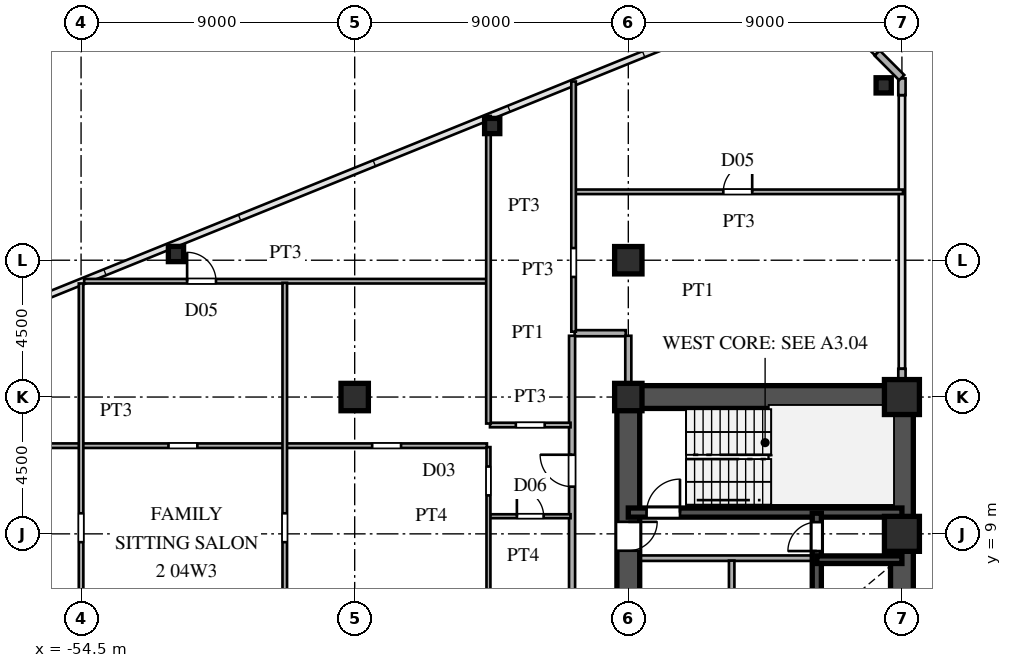
"""IFC4 building model, lengths in metres.
Left out: names, types, materials, properties, quantities, classifications, styles, units other than length and angle.
Written with IfcOpenShell. Run it as: python <this file> out.ifc"""

import sys

from ifc_helpers import new_model, si_unit, direction, frame, frame_2d, origin, origin_2d, place, context, subcontext, project, spatial, rectangle, hollow_rectangle, i_section, extrude, source, transform, mapped, element, fill, save


model = new_model("IFC4")
c1 = context("Model", 3, precision=1e-05, world=origin(), true_north=direction((0.0, 1.0)))
c2 = subcontext(c1, "Body", "Model", "MODEL_VIEW")
j1 = project(units=[si_unit("LENGTHUNIT", "METRE"), si_unit("PLANEANGLEUNIT", "RADIAN")], contexts=[c1])
p1 = place(None, origin())
s1 = spatial("IfcSite", under=j1, at=p1, CompositionType="ELEMENT")
p2 = place(p1, origin())
s2 = spatial("IfcBuilding", under=s1, at=p2, CompositionType="ELEMENT")
p3 = place(p2, frame((0.0, 0.0, 18.9)))
s3 = spatial("IfcBuildingStorey", under=s2, at=p3, CompositionType="ELEMENT", Elevation=18.9)
m1 = source(origin(), c2, "Body", "SweptSolid", [
    extrude(hollow_rectangle(XDim=1.15, YDim=1.15, WallThickness=0.048, at=origin_2d()), origin(), (0.0, 0.0, 1.0), 3.6),
])
for number, where, z_axis, x_axis in (
    (1, (-27.5, 9.0, 0.0), (0.0, 0.0, 1.0), (1.0, 0.0, 0.0)),
    (2, (-27.5, 13.5, 0.0), (0.0, 0.0, 1.0), (1.0, 0.0, 0.0)),
):
    element("IfcColumn", number, at=place(p3, frame(where, z_axis=z_axis, x_axis=x_axis)), inside=s3, PredefinedType="COLUMN", context=c2, shape_type="MappedRepresentation", body=[
        mapped(m1, transform((0.0, 0.0, 0.0), scale=1.0)),
    ])
m2 = source(origin(), c2, "Body", "SweptSolid", [
    extrude(i_section(OverallWidth=0.9, OverallDepth=0.9, WebThickness=0.036, FlangeThickness=0.055, at=origin_2d()), origin(), (0.0, 0.0, 1.0), 3.6),
])
for number, where, z_axis, x_axis in (
    (3, (-36.5, 13.5, 0.0), (0.0, 0.0, 1.0), (1.0, 0.0, 0.0)),
    (4, (-36.5, 18.0, 0.0), (0.0, 0.0, 1.0), (1.0, 0.0, 0.0)),
    (5, (-45.5, 13.5, 0.0), (0.0, 0.0, 1.0), (1.0, 0.0, 0.0)),
):
    element("IfcColumn", number, at=place(p3, frame(where, z_axis=z_axis, x_axis=x_axis)), inside=s3, PredefinedType="COLUMN", context=c2, shape_type="MappedRepresentation", body=[
        mapped(m2, transform((0.0, 0.0, 0.0), scale=1.0)),
    ])
m3 = source(origin(), c2, "Body", "SweptSolid", [
    extrude(hollow_rectangle(XDim=0.5, YDim=0.5, WallThickness=0.02, at=origin_2d()), origin(), (0.0, 0.0, 1.0), 3.6),
])
for number, where, z_axis, x_axis in (
    (6, (-28.1, 23.751, 0.0), (0.0, 0.0, 1.0), (1.0, 0.0, 0.0)),
    (7, (-40.977, 22.414, 0.0), (0.0, 0.0, 1.0), (1.0, 0.0, 0.0)),
    (8, (-51.378, 18.204, 0.0), (0.0, 0.0, 1.0), (1.0, 0.0, 0.0)),
):
    element("IfcColumn", number, at=place(p3, frame(where, z_axis=z_axis, x_axis=x_axis)), inside=s3, PredefinedType="COLUMN", context=c2, shape_type="MappedRepresentation", body=[
        mapped(m3, transform((0.0, 0.0, 0.0), scale=1.0)),
    ])
p4 = place(p3, frame((-27.5, 13.88, 0.0), z_axis=(0.0, 0.0, 1.0), x_axis=(0.0, 1.0, 0.0)))
e9 = element("IfcWall", 9, at=p4, inside=s3, PredefinedType="SOLIDWALL", context=c2, shape_type="SweptSolid", body=[
    extrude(rectangle(XDim=0.55, YDim=0.24, at=frame_2d((0.275, 0.0))), origin(), (0.0, 0.0, 1.0), 2.88),
])
p5 = place(p3, frame((-27.5, 23.43, 0.0), z_axis=(0.0, 0.0, 1.0), x_axis=(0.0, 1.0, 0.0)))
e10 = element("IfcWall", 10, at=p5, inside=s3, PredefinedType="SOLIDWALL", context=c2, shape_type="SweptSolid", body=[
    extrude(rectangle(XDim=0.55, YDim=0.24, at=frame_2d((0.275, 0.0))), origin(), (0.0, 0.0, 1.0), 3.38),
])
p6 = place(p3, frame((-27.507, 24.007, 0.0), z_axis=(0.0, 0.0, 1.0), x_axis=(-0.707106781187, 0.707106781187, 0.0)))
e11 = element("IfcWall", 11, at=p6, inside=s3, PredefinedType="SOLIDWALL", context=c2, shape_type="SweptSolid", body=[
    extrude(rectangle(XDim=1.14, YDim=0.24, at=frame_2d((0.57, 0.0))), origin(), (0.0, 0.0, 1.0), 3.38),
])
p7 = place(p3, frame((-27.5, 1.3, 0.0), z_axis=(0.0, 0.0, 1.0), x_axis=(0.0, 1.0, 0.0)))
e12 = element("IfcWall", 12, at=p7, inside=s3, PredefinedType="SHEAR", context=c2, shape_type="SweptSolid", body=[
    extrude(rectangle(XDim=12.2, YDim=0.75, at=frame_2d((6.1, 0.0))), origin(), (0.0, 0.0, 1.0), 3.38),
])
p8 = place(p3, frame((-36.5, 13.5, 0.0), z_axis=(0.0, 0.0, 1.0), x_axis=(1.0, 0.0, 0.0)))
e13 = element("IfcWall", 13, at=p8, inside=s3, PredefinedType="SHEAR", context=c2, shape_type="SweptSolid", body=[
    extrude(rectangle(XDim=9.0, YDim=0.75, at=frame_2d((4.5, 0.0))), origin(), (0.0, 0.0, 1.0), 3.38),
])
p9 = place(p3, frame((-36.5, 8.2, 0.0), z_axis=(0.0, 0.0, 1.0), x_axis=(0.0, 1.0, 0.0)))
e14 = element("IfcWall", 14, at=p9, inside=s3, PredefinedType="SHEAR", context=c2, shape_type="SweptSolid", body=[
    extrude(rectangle(XDim=5.45, YDim=0.75, at=frame_2d((2.725, 0.0))), origin(), (0.0, 0.0, 1.0), 3.38),
])
p10 = place(p9, frame((0.245, 0.0, 0.0)))
e15 = element("IfcOpeningElement", 15, at=p10, cuts=e14, PredefinedType="OPENING", context=c2, shape_type="SweptSolid", body=[
    extrude(rectangle(XDim=0.95, YDim=2.15, at=frame_2d((0.475, 1.075))), frame((0.0, 0.385, 0.0), z_axis=(0.0, -1.0, 0.0), x_axis=(1.0, 0.0, 0.0)), (0.0, 0.0, 1.0), 0.77),
])
p11 = place(p3, frame((-36.5, 1.3, 0.0), z_axis=(0.0, 0.0, 1.0), x_axis=(0.0, 1.0, 0.0)))
e16 = element("IfcWall", 16, at=p11, inside=s3, PredefinedType="SHEAR", context=c2, shape_type="SweptSolid", body=[
    extrude(rectangle(XDim=6.9, YDim=0.75, at=frame_2d((3.45, 0.0))), origin(), (0.0, 0.0, 1.0), 3.38),
])
p12 = place(p11, frame((2.975, 0.0, 0.0)))
e17 = element("IfcOpeningElement", 17, at=p12, cuts=e16, PredefinedType="OPENING", context=c2, shape_type="SweptSolid", body=[
    extrude(rectangle(XDim=0.95, YDim=2.15, at=frame_2d((0.475, 1.075))), frame((0.0, 0.385, 0.0), z_axis=(0.0, -1.0, 0.0), x_axis=(1.0, 0.0, 0.0)), (0.0, 0.0, 1.0), 0.77),
])
p13 = place(p3, frame((-36.5, 9.7, 0.0), z_axis=(0.0, 0.0, 1.0), x_axis=(1.0, 0.0, 0.0)))
e18 = element("IfcWall", 18, at=p13, inside=s3, PredefinedType="SHEAR", context=c2, shape_type="SweptSolid", body=[
    extrude(rectangle(XDim=9.0, YDim=0.3, at=frame_2d((4.5, 0.0))), origin(), (0.0, 0.0, 1.0), 3.38),
])
p14 = place(p13, frame((0.6, 0.0, 0.0)))
e19 = element("IfcOpeningElement", 19, at=p14, cuts=e18, PredefinedType="OPENING", context=c2, shape_type="SweptSolid", body=[
    extrude(rectangle(XDim=1.1, YDim=2.2, at=frame_2d((0.55, 1.1))), frame((0.0, 0.16, 0.0), z_axis=(0.0, -1.0, 0.0), x_axis=(1.0, 0.0, 0.0)), (0.0, 0.0, 1.0), 0.32),
])
p15 = place(p3, frame((-30.3, 8.15, 0.0), z_axis=(0.0, 0.0, 1.0), x_axis=(1.0, 0.0, 0.0)))
e20 = element("IfcWall", 20, at=p15, inside=s3, PredefinedType="SHEAR", context=c2, shape_type="SweptSolid", body=[
    extrude(rectangle(XDim=2.8, YDim=0.25, at=frame_2d((1.4, 0.0))), origin(), (0.0, 0.0, 1.0), 3.38),
])
p16 = place(p3, frame((-30.3, 5.9, 0.0), z_axis=(0.0, 0.0, 1.0), x_axis=(0.0, 1.0, 0.0)))
e21 = element("IfcWall", 21, at=p16, inside=s3, PredefinedType="SHEAR", context=c2, shape_type="SweptSolid", body=[
    extrude(rectangle(XDim=2.25, YDim=0.3, at=frame_2d((1.125, 0.0))), origin(), (0.0, 0.0, 1.0), 3.38),
])
p17 = place(p3, frame((-30.3, 8.15, 0.0), z_axis=(0.0, 0.0, 1.0), x_axis=(0.0, 1.0, 0.0)))
e22 = element("IfcWall", 22, at=p17, inside=s3, PredefinedType="SHEAR", context=c2, shape_type="SweptSolid", body=[
    extrude(rectangle(XDim=1.53, YDim=0.3, at=frame_2d((0.765, 0.0))), origin(), (0.0, 0.0, 1.0), 3.38),
])
p18 = place(p17, frame((0.285, 0.0, 0.0)))
e23 = element("IfcOpeningElement", 23, at=p18, cuts=e22, PredefinedType="OPENING", context=c2, shape_type="SweptSolid", body=[
    extrude(rectangle(XDim=0.95, YDim=2.15, at=frame_2d((0.475, 1.075))), frame((0.0, 0.16, 0.0), z_axis=(0.0, -1.0, 0.0), x_axis=(1.0, 0.0, 0.0)), (0.0, 0.0, 1.0), 0.32),
])
p19 = place(p3, frame((-36.15, 8.2, 0.0), z_axis=(0.0, 0.0, 1.0), x_axis=(1.0, 0.0, 0.0)))
e24 = element("IfcWall", 24, at=p19, inside=s3, PredefinedType="PARTITIONING", context=c2, shape_type="SweptSolid", body=[
    extrude(rectangle(XDim=5.7, YDim=0.18, at=frame_2d((2.85, 0.0))), origin(), (0.0, 0.0, 1.0), 3.38),
])
p20 = place(p3, frame((-33.1, 1.38, 0.0), z_axis=(0.0, 0.0, 1.0), x_axis=(0.0, 1.0, 0.0)))
e25 = element("IfcWall", 25, at=p20, inside=s3, PredefinedType="PARTITIONING", context=c2, shape_type="SweptSolid", body=[
    extrude(rectangle(XDim=6.74, YDim=0.18, at=frame_2d((3.37, 0.0))), origin(), (0.0, 0.0, 1.0), 3.38),
])
p21 = place(p3, frame((-41.05, 9.58, 0.0), z_axis=(0.0, 0.0, 1.0), x_axis=(1.0, 0.0, 0.0)))
e26 = element("IfcWall", 26, at=p21, inside=s3, PredefinedType="PARTITIONING", context=c2, shape_type="SweptSolid", body=[
    extrude(rectangle(XDim=2.65, YDim=0.13, at=frame_2d((1.325, 0.0))), origin(), (0.0, 0.0, 1.0), 3.38),
])
p22 = place(p21, frame((0.885, 0.0, 0.0)))
e27 = element("IfcOpeningElement", 27, at=p22, cuts=e26, PredefinedType="OPENING", context=c2, shape_type="SweptSolid", body=[
    extrude(rectangle(XDim=0.88, YDim=2.1, at=frame_2d((0.44, 1.05))), frame((0.0, 0.075, 0.0), z_axis=(0.0, -1.0, 0.0), x_axis=(1.0, 0.0, 0.0)), (0.0, 0.0, 1.0), 0.15),
])
p23 = place(p3, frame((-67.833, 11.9, 0.0), z_axis=(0.0, 0.0, 1.0), x_axis=(1.0, 0.0, 0.0)))
e28 = element("IfcWall", 28, at=p23, inside=s3, PredefinedType="PARTITIONING", context=c2, shape_type="SweptSolid", body=[
    extrude(rectangle(XDim=26.683, YDim=0.15, at=frame_2d((13.342, 0.0))), origin(), (0.0, 0.0, 1.0), 3.38),
])
p24 = place(p23, frame((22.908, 0.0, 0.0)))
e29 = element("IfcOpeningElement", 29, at=p24, cuts=e28, PredefinedType="OPENING", context=c2, shape_type="SweptSolid", body=[
    extrude(rectangle(XDim=0.95, YDim=2.15, at=frame_2d((0.475, 1.075))), frame((0.0, 0.085, 0.0), z_axis=(0.0, -1.0, 0.0), x_axis=(1.0, 0.0, 0.0)), (0.0, 0.0, 1.0), 0.17),
])
p25 = place(p23, frame((3.359, 0.0, 0.0)))
e30 = element("IfcOpeningElement", 30, at=p25, cuts=e28, PredefinedType="OPENING", context=c2, shape_type="SweptSolid", body=[
    extrude(rectangle(XDim=0.95, YDim=2.15, at=frame_2d((0.475, 1.075))), frame((0.0, 0.085, 0.0), z_axis=(0.0, -1.0, 0.0), x_axis=(1.0, 0.0, 0.0)), (0.0, 0.0, 1.0), 0.17),
])
p26 = place(p23, frame((16.208, 0.0, 0.0)))
e31 = element("IfcOpeningElement", 31, at=p26, cuts=e28, PredefinedType="OPENING", context=c2, shape_type="SweptSolid", body=[
    extrude(rectangle(XDim=0.95, YDim=2.15, at=frame_2d((0.475, 1.075))), frame((0.0, 0.085, 0.0), z_axis=(0.0, -1.0, 0.0), x_axis=(1.0, 0.0, 0.0)), (0.0, 0.0, 1.0), 0.17),
])
p27 = place(p3, frame((-41.05, 12.58, 0.0), z_axis=(0.0, 0.0, 1.0), x_axis=(1.0, 0.0, 0.0)))
e32 = element("IfcWall", 32, at=p27, inside=s3, PredefinedType="PARTITIONING", context=c2, shape_type="SweptSolid", body=[
    extrude(rectangle(XDim=2.65, YDim=0.15, at=frame_2d((1.325, 0.0))), origin(), (0.0, 0.0, 1.0), 3.38),
])
p28 = place(p27, frame((0.85, 0.0, 0.0)))
e33 = element("IfcOpeningElement", 33, at=p28, cuts=e32, PredefinedType="OPENING", context=c2, shape_type="SweptSolid", body=[
    extrude(rectangle(XDim=0.95, YDim=2.15, at=frame_2d((0.475, 1.075))), frame((0.0, 0.085, 0.0), z_axis=(0.0, -1.0, 0.0), x_axis=(1.0, 0.0, 0.0)), (0.0, 0.0, 1.0), 0.17),
])
p29 = place(p3, frame((-38.265, 15.6, 0.0), z_axis=(0.0, 0.0, 1.0), x_axis=(1.0, 0.0, 0.0)))
e34 = element("IfcWall", 34, at=p29, inside=s3, PredefinedType="PARTITIONING", context=c2, shape_type="SweptSolid", body=[
    extrude(rectangle(XDim=1.68, YDim=0.2, at=frame_2d((0.84, 0.0))), origin(), (0.0, 0.0, 1.0), 3.38),
])
p30 = place(p3, frame((-54.399, 17.31, 0.0), z_axis=(0.0, 0.0, 1.0), x_axis=(1.0, 0.0, 0.0)))
e35 = element("IfcWall", 35, at=p30, inside=s3, PredefinedType="PARTITIONING", context=c2, shape_type="SweptSolid", body=[
    extrude(rectangle(XDim=13.249, YDim=0.15, at=frame_2d((6.625, 0.0))), origin(), (0.0, 0.0, 1.0), 3.38),
])
p31 = place(p30, frame((3.387, 0.0, 0.0)))
e36 = element("IfcOpeningElement", 36, at=p31, cuts=e35, PredefinedType="OPENING", context=c2, shape_type="SweptSolid", body=[
    extrude(rectangle(XDim=0.95, YDim=2.15, at=frame_2d((0.475, 1.075))), frame((0.0, 0.085, 0.0), z_axis=(0.0, -1.0, 0.0), x_axis=(1.0, 0.0, 0.0)), (0.0, 0.0, 1.0), 0.17),
])
p32 = place(p3, frame((-38.25, 20.25, 0.0), z_axis=(0.0, 0.0, 1.0), x_axis=(1.0, 0.0, 0.0)))
e37 = element("IfcWall", 37, at=p32, inside=s3, PredefinedType="PARTITIONING", context=c2, shape_type="SweptSolid", body=[
    extrude(rectangle(XDim=10.785, YDim=0.15, at=frame_2d((5.393, 0.0))), origin(), (0.0, 0.0, 1.0), 3.38),
])
p33 = place(p32, frame((4.875, 0.0, 0.0)))
e38 = element("IfcOpeningElement", 38, at=p33, cuts=e37, PredefinedType="OPENING", context=c2, shape_type="SweptSolid", body=[
    extrude(rectangle(XDim=0.95, YDim=2.15, at=frame_2d((0.475, 1.075))), frame((0.0, 0.085, 0.0), z_axis=(0.0, -1.0, 0.0), x_axis=(1.0, 0.0, 0.0)), (0.0, 0.0, 1.0), 0.17),
])
p34 = place(p3, frame((-54.5, -17.321, 0.0), z_axis=(0.0, 0.0, 1.0), x_axis=(0.0, 1.0, 0.0)))
e39 = element("IfcWall", 39, at=p34, inside=s3, PredefinedType="PARTITIONING", context=c2, shape_type="SweptSolid", body=[
    extrude(rectangle(XDim=34.557, YDim=0.15, at=frame_2d((17.279, 0.0))), origin(), (0.0, 0.0, 1.0), 2.68),
])
p35 = place(p34, frame((6.811, 0.0, 0.0)))
e40 = element("IfcOpeningElement", 40, at=p35, cuts=e39, PredefinedType="OPENING", context=c2, shape_type="SweptSolid", body=[
    extrude(rectangle(XDim=0.95, YDim=2.15, at=frame_2d((0.475, 1.075))), frame((0.0, 0.085, 0.0), z_axis=(0.0, -1.0, 0.0), x_axis=(1.0, 0.0, 0.0)), (0.0, 0.0, 1.0), 0.17),
])
p36 = place(p34, frame((16.346, 0.0, 0.0)))
e41 = element("IfcOpeningElement", 41, at=p36, cuts=e39, PredefinedType="OPENING", context=c2, shape_type="SweptSolid", body=[
    extrude(rectangle(XDim=0.95, YDim=2.15, at=frame_2d((0.475, 1.075))), frame((0.0, 0.085, 0.0), z_axis=(0.0, -1.0, 0.0), x_axis=(1.0, 0.0, 0.0)), (0.0, 0.0, 1.0), 0.17),
])
p37 = place(p34, frame((11.312, 0.0, 0.0)))
e42 = element("IfcOpeningElement", 42, at=p37, cuts=e39, PredefinedType="OPENING", context=c2, shape_type="SweptSolid", body=[
    extrude(rectangle(XDim=0.95, YDim=2.15, at=frame_2d((0.475, 1.075))), frame((0.0, 0.085, 0.0), z_axis=(0.0, -1.0, 0.0), x_axis=(1.0, 0.0, 0.0)), (0.0, 0.0, 1.0), 0.17),
])
p38 = place(p34, frame((20.352, 0.0, 0.0)))
e43 = element("IfcOpeningElement", 43, at=p38, cuts=e39, PredefinedType="OPENING", context=c2, shape_type="SweptSolid", body=[
    extrude(rectangle(XDim=0.95, YDim=2.15, at=frame_2d((0.475, 1.075))), frame((0.0, 0.085, 0.0), z_axis=(0.0, -1.0, 0.0), x_axis=(1.0, 0.0, 0.0)), (0.0, 0.0, 1.0), 0.17),
])
p39 = place(p34, frame((26.048, 0.0, 0.0)))
e44 = element("IfcOpeningElement", 44, at=p39, cuts=e39, PredefinedType="OPENING", context=c2, shape_type="SweptSolid", body=[
    extrude(rectangle(XDim=0.95, YDim=2.15, at=frame_2d((0.475, 1.075))), frame((0.0, 0.085, 0.0), z_axis=(0.0, -1.0, 0.0), x_axis=(1.0, 0.0, 0.0)), (0.0, 0.0, 1.0), 0.17),
])
p40 = place(p3, frame((-47.8, -17.59, 0.0), z_axis=(0.0, 0.0, 1.0), x_axis=(0.0, 1.0, 0.0)))
e45 = element("IfcWall", 45, at=p40, inside=s3, PredefinedType="PARTITIONING", context=c2, shape_type="SweptSolid", body=[
    extrude(rectangle(XDim=34.846, YDim=0.15, at=frame_2d((17.423, 0.0))), origin(), (0.0, 0.0, 1.0), 3.38),
])
p41 = place(p40, frame((7.08, 0.0, 0.0)))
e46 = element("IfcOpeningElement", 46, at=p41, cuts=e45, PredefinedType="OPENING", context=c2, shape_type="SweptSolid", body=[
    extrude(rectangle(XDim=0.95, YDim=2.15, at=frame_2d((0.475, 1.075))), frame((0.0, 0.085, 0.0), z_axis=(0.0, -1.0, 0.0), x_axis=(1.0, 0.0, 0.0)), (0.0, 0.0, 1.0), 0.17),
])
p42 = place(p40, frame((16.615, 0.0, 0.0)))
e47 = element("IfcOpeningElement", 47, at=p42, cuts=e45, PredefinedType="OPENING", context=c2, shape_type="SweptSolid", body=[
    extrude(rectangle(XDim=0.95, YDim=2.15, at=frame_2d((0.475, 1.075))), frame((0.0, 0.085, 0.0), z_axis=(0.0, -1.0, 0.0), x_axis=(1.0, 0.0, 0.0)), (0.0, 0.0, 1.0), 0.17),
])
p43 = place(p40, frame((26.317, 0.0, 0.0)))
e48 = element("IfcOpeningElement", 48, at=p43, cuts=e45, PredefinedType="OPENING", context=c2, shape_type="SweptSolid", body=[
    extrude(rectangle(XDim=0.95, YDim=2.15, at=frame_2d((0.475, 1.075))), frame((0.0, 0.085, 0.0), z_axis=(0.0, -1.0, 0.0), x_axis=(1.0, 0.0, 0.0)), (0.0, 0.0, 1.0), 0.17),
])
p44 = place(p3, frame((-41.1, 2.352, 0.0), z_axis=(0.0, 0.0, 1.0), x_axis=(0.0, 1.0, 0.0)))
e49 = element("IfcWall", 49, at=p44, inside=s3, PredefinedType="PARTITIONING", context=c2, shape_type="SweptSolid", body=[
    extrude(rectangle(XDim=9.501, YDim=0.13, at=frame_2d((4.75, 0.0))), origin(), (0.0, 0.0, 1.0), 3.38),
])
p45 = place(p44, frame((7.913, 0.0, 0.0)))
e50 = element("IfcOpeningElement", 50, at=p45, cuts=e49, PredefinedType="OPENING", context=c2, shape_type="SweptSolid", body=[
    extrude(rectangle(XDim=0.95, YDim=2.15, at=frame_2d((0.475, 1.075))), frame((0.0, 0.075, 0.0), z_axis=(0.0, -1.0, 0.0), x_axis=(1.0, 0.0, 0.0)), (0.0, 0.0, 1.0), 0.15),
])
p46 = place(p3, frame((-41.1, 12.628, 0.0), z_axis=(0.0, 0.0, 1.0), x_axis=(0.0, 1.0, 0.0)))
e51 = element("IfcWall", 51, at=p46, inside=s3, PredefinedType="PARTITIONING", context=c2, shape_type="SweptSolid", body=[
    extrude(rectangle(XDim=10.116, YDim=0.15, at=frame_2d((5.058, 0.0))), origin(), (0.0, 0.0, 1.0), 2.99),
])
p47 = place(p3, frame((-38.35, -15.515, 0.0), z_axis=(0.0, 0.0, 1.0), x_axis=(0.0, 1.0, 0.0)))
e52 = element("IfcWall", 52, at=p47, inside=s3, PredefinedType="PARTITIONING", context=c2, shape_type="SweptSolid", body=[
    extrude(rectangle(XDim=31.03, YDim=0.2, at=frame_2d((15.515, 0.0))), origin(), (0.0, 0.0, 1.0), 3.38),
])
p48 = place(p47, frame((3.345, 0.0, 0.0)))
e53 = element("IfcOpeningElement", 53, at=p48, cuts=e52, PredefinedType="OPENING", context=c2, shape_type="SweptSolid", body=[
    extrude(rectangle(XDim=1.05, YDim=2.25, at=frame_2d((0.525, 1.125))), frame((0.0, 0.11, 0.0), z_axis=(0.0, -1.0, 0.0), x_axis=(1.0, 0.0, 0.0)), (0.0, 0.0, 1.0), 0.22),
])
p49 = place(p47, frame((14.28, 0.0, 0.0)))
e54 = element("IfcOpeningElement", 54, at=p49, cuts=e52, PredefinedType="OPENING", context=c2, shape_type="SweptSolid", body=[
    extrude(rectangle(XDim=1.05, YDim=2.25, at=frame_2d((0.525, 1.125))), frame((0.0, 0.11, 0.0), z_axis=(0.0, -1.0, 0.0), x_axis=(1.0, 0.0, 0.0)), (0.0, 0.0, 1.0), 0.22),
])
p50 = place(p47, frame((26.067, 0.0, 0.0)))
e55 = element("IfcOpeningElement", 55, at=p50, cuts=e52, PredefinedType="OPENING", context=c2, shape_type="SweptSolid", body=[
    extrude(rectangle(XDim=1.05, YDim=2.25, at=frame_2d((0.525, 1.125))), frame((0.0, 0.11, 0.0), z_axis=(0.0, -1.0, 0.0), x_axis=(1.0, 0.0, 0.0)), (0.0, 0.0, 1.0), 0.22),
])
p51 = place(p3, frame((-38.3, 15.65, 0.0), z_axis=(0.0, 0.0, 1.0), x_axis=(0.0, 1.0, 0.0)))
e56 = element("IfcWall", 56, at=p51, inside=s3, PredefinedType="PARTITIONING", context=c2, shape_type="SweptSolid", body=[
    extrude(rectangle(XDim=8.228, YDim=0.15, at=frame_2d((4.114, 0.0))), origin(), (0.0, 0.0, 1.0), 3.38),
])
p52 = place(p51, frame((1.8, 0.0, 0.0)))
e57 = element("IfcOpeningElement", 57, at=p52, cuts=e56, PredefinedType="OPENING", context=c2, shape_type="SweptSolid", body=[
    extrude(rectangle(XDim=0.95, YDim=2.15, at=frame_2d((0.475, 1.075))), frame((0.0, 0.085, 0.0), z_axis=(0.0, -1.0, 0.0), x_axis=(1.0, 0.0, 0.0)), (0.0, 0.0, 1.0), 0.17),
])
p53 = place(p3, frame((-36.5, 13.88, 0.0), z_axis=(0.0, 0.0, 1.0), x_axis=(0.0, 1.0, 0.0)))
e58 = element("IfcWall", 58, at=p53, inside=s3, PredefinedType="PARTITIONING", context=c2, shape_type="SweptSolid", body=[
    extrude(rectangle(XDim=1.635, YDim=0.2, at=frame_2d((0.817, 0.0))), origin(), (0.0, 0.0, 1.0), 2.68),
])
m4 = source(origin(), c2, "Body", "SweptSolid", [
    extrude(rectangle(XDim=0.95, YDim=2.15, at=frame_2d((0.475, 1.075))), frame((0.0, 0.025, 0.0), z_axis=(0.0, -1.0, 0.0), x_axis=(1.0, 0.0, 0.0)), (0.0, 0.0, 1.0), 0.05),
])
p54 = place(p10, frame((0.95, 0.0, 0.0), z_axis=(0.0, 0.0, 1.0), x_axis=(-1.0, 0.0, 0.0)))
e59 = element("IfcDoor", 59, at=p54, inside=s3, OperationType="SINGLE_SWING_RIGHT", PredefinedType="DOOR", context=c2, shape_type="MappedRepresentation", body=[
    mapped(m4, transform((0.0, 0.0, 0.0), scale=1.0)),
])
fill(e15, e59)
m5 = source(origin(), c2, "Body", "SweptSolid", [
    extrude(rectangle(XDim=1.1, YDim=2.2, at=frame_2d((0.55, 1.1))), frame((0.0, 0.025, 0.0), z_axis=(0.0, -1.0, 0.0), x_axis=(1.0, 0.0, 0.0)), (0.0, 0.0, 1.0), 0.05),
])
p55 = place(p14, origin())
e60 = element("IfcDoor", 60, at=p55, inside=s3, OperationType="SINGLE_SWING_RIGHT", PredefinedType="DOOR", context=c2, shape_type="MappedRepresentation", body=[
    mapped(m5, transform((0.0, 0.0, 0.0), scale=1.0)),
])
fill(e19, e60)
p56 = place(p18, origin())
e61 = element("IfcDoor", 61, at=p56, inside=s3, OperationType="SINGLE_SWING_LEFT", PredefinedType="DOOR", context=c2, shape_type="MappedRepresentation", body=[
    mapped(m4, transform((0.0, 0.0, 0.0), scale=1.0)),
])
fill(e23, e61)
m6 = source(origin(), c2, "Body", "SweptSolid", [
    extrude(rectangle(XDim=0.88, YDim=2.1, at=frame_2d((0.44, 1.05))), frame((0.0, 0.025, 0.0), z_axis=(0.0, -1.0, 0.0), x_axis=(1.0, 0.0, 0.0)), (0.0, 0.0, 1.0), 0.05),
])
p57 = place(p22, origin())
e62 = element("IfcDoor", 62, at=p57, inside=s3, OperationType="SINGLE_SWING_LEFT", PredefinedType="DOOR", context=c2, shape_type="MappedRepresentation", body=[
    mapped(m6, transform((0.0, 0.0, 0.0), scale=1.0)),
])
fill(e27, e62)
m7 = source(origin(), c2, "Body", "SweptSolid", [
    extrude(rectangle(XDim=0.95, YDim=2.15, at=frame_2d((0.475, 1.075))), frame((0.0, 0.025, 0.0), z_axis=(0.0, -1.0, 0.0), x_axis=(1.0, 0.0, 0.0)), (0.0, 0.0, 1.0), 0.05),
])
p58 = place(p31, origin())
e63 = element("IfcDoor", 63, at=p58, inside=s3, OperationType="SINGLE_SWING_LEFT", PredefinedType="DOOR", context=c2, shape_type="MappedRepresentation", body=[
    mapped(m7, transform((0.0, 0.0, 0.0), scale=1.0)),
])
fill(e36, e63)
p59 = place(p33, origin())
e64 = element("IfcDoor", 64, at=p59, inside=s3, OperationType="SINGLE_SWING_RIGHT", PredefinedType="DOOR", context=c2, shape_type="MappedRepresentation", body=[
    mapped(m7, transform((0.0, 0.0, 0.0), scale=1.0)),
])
fill(e38, e64)
m8 = source(origin(), c2, "Body", "SweptSolid", [
    extrude(rectangle(XDim=1.05, YDim=2.25, at=frame_2d((0.525, 1.125))), frame((0.0, 0.025, 0.0), z_axis=(0.0, -1.0, 0.0), x_axis=(1.0, 0.0, 0.0)), (0.0, 0.0, 1.0), 0.05),
])
p60 = place(p50, origin())
e65 = element("IfcDoor", 65, at=p60, inside=s3, OperationType="SINGLE_SWING_RIGHT", PredefinedType="DOOR", context=c2, shape_type="MappedRepresentation", body=[
    mapped(m8, transform((0.0, 0.0, 0.0), scale=1.0)),
])
fill(e55, e65)
save(model, sys.argv[1])
